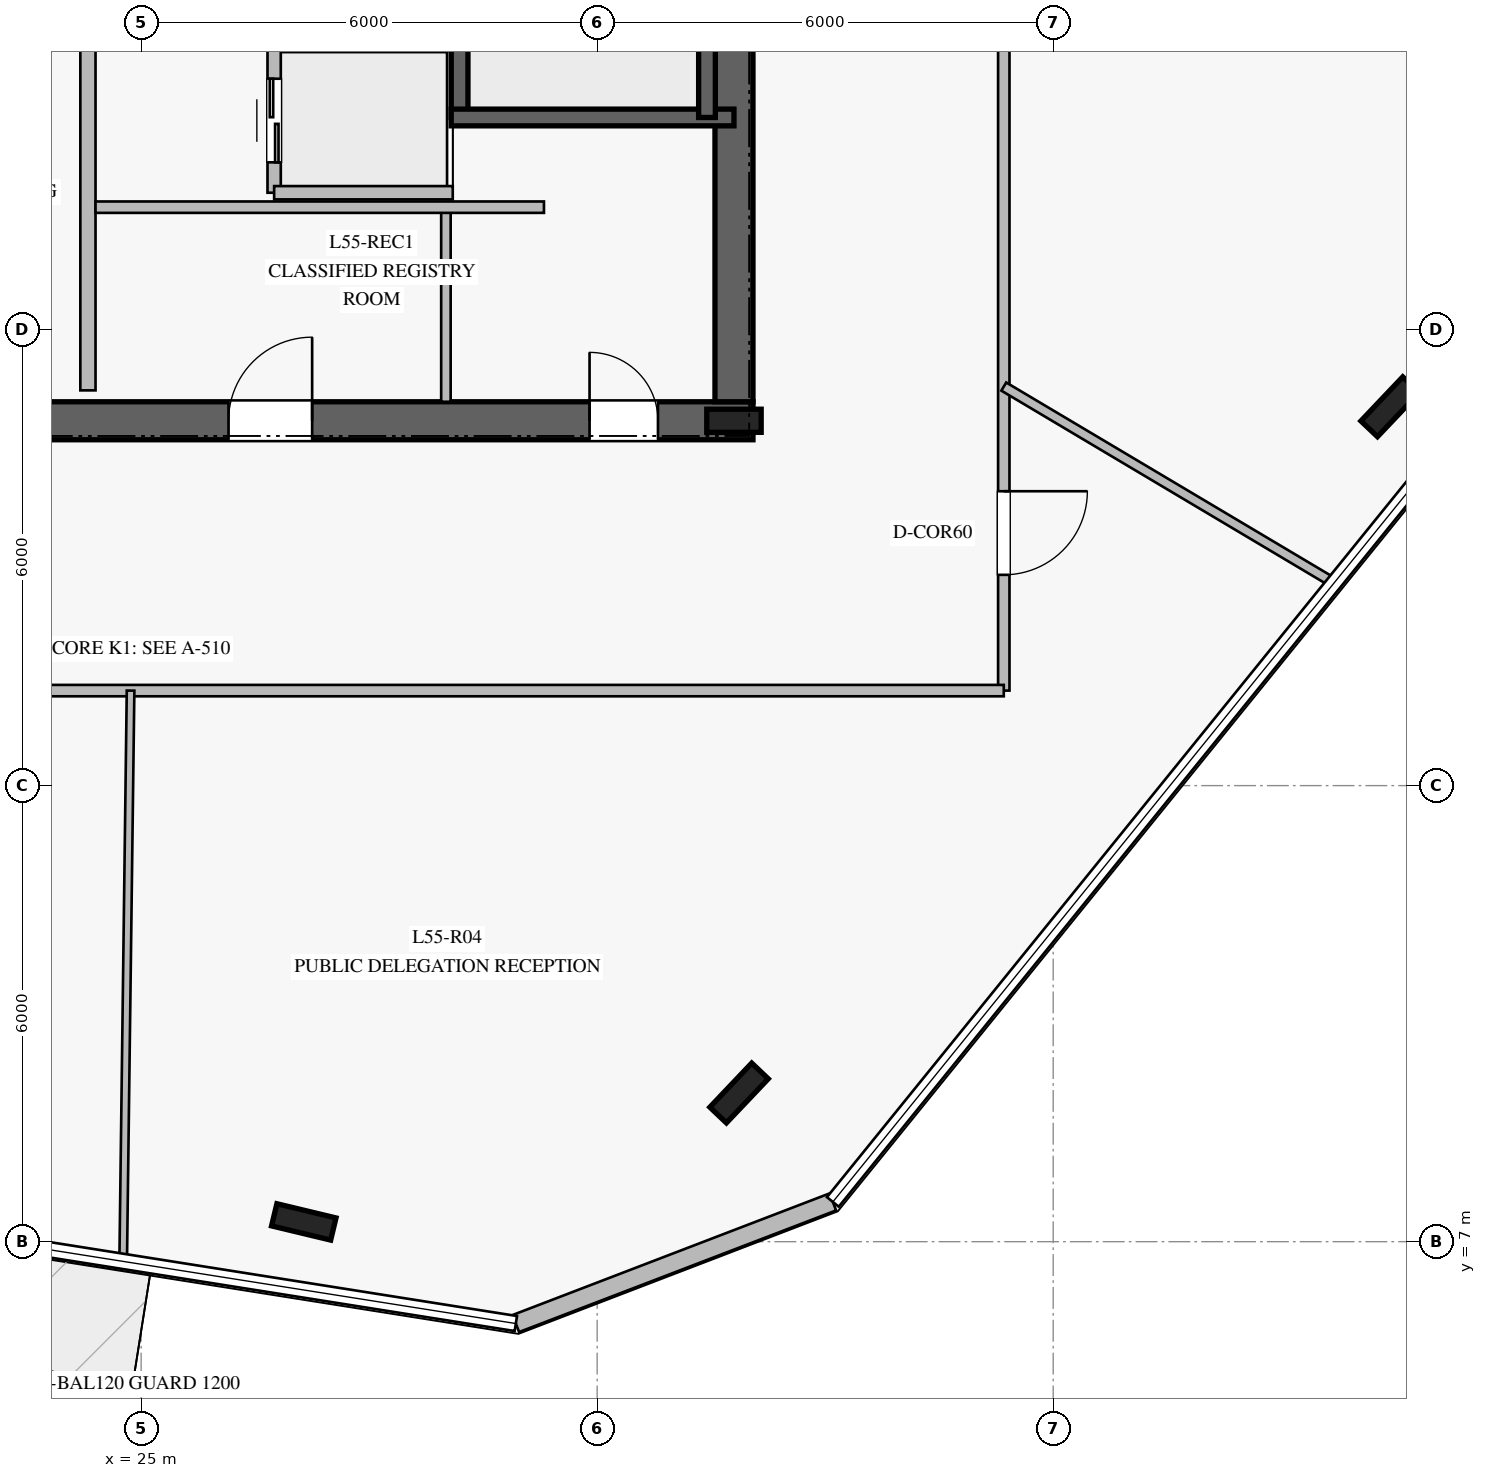
"""IFC4 building model, lengths in metres.
Left out: names, types, materials, properties, quantities, classifications, styles, units other than length and angle.
Written with IfcOpenShell. Run it as: python <this file> out.ifc"""

import sys

from ifc_helpers import new_model, si_unit, direction, frame, frame_2d, origin, origin_2d, place, context, subcontext, project, spatial, rectangle, i_section, extrude, element, fill, save


model = new_model("IFC4")
c1 = context("Model", 3, precision=1e-05, world=origin(), true_north=direction((0.0, 1.0)))
c2 = subcontext(c1, "Body", "Model", "MODEL_VIEW")
j1 = project(units=[si_unit("LENGTHUNIT", "METRE"), si_unit("PLANEANGLEUNIT", "RADIAN")], contexts=[c1])
p1 = place(None, origin())
s1 = spatial("IfcSite", under=j1, at=p1, CompositionType="ELEMENT")
p2 = place(p1, origin())
s2 = spatial("IfcBuilding", under=s1, at=p2, CompositionType="ELEMENT")
p3 = place(p2, frame((0.0, 0.0, 228.8)))
s3 = spatial("IfcBuildingStorey", under=s2, at=p3, CompositionType="ELEMENT", Elevation=228.8)
p4 = place(p3, frame((16.95, 17.8, 0.0), z_axis=(0.0, 0.0, 1.0), x_axis=(1.0, 0.0, 0.0)))
e1 = element("IfcWall", 1, at=p4, inside=s3, PredefinedType="SHEAR", context=c2, shape_type="SweptSolid", body=[
    extrude(rectangle(XDim=16.1, YDim=0.5, at=frame_2d((8.05, 0.0))), origin(), (0.0, 0.0, 1.0), 3.78),
])
p5 = place(p4, frame((5.0, 0.0, 0.0)))
e2 = element("IfcOpeningElement", 2, at=p5, cuts=e1, PredefinedType="OPENING", context=c2, shape_type="SweptSolid", body=[
    extrude(rectangle(XDim=1.2, YDim=2.25, at=frame_2d((0.6, 1.125))), frame((0.0, 0.26, 0.0), z_axis=(0.0, -1.0, 0.0), x_axis=(1.0, 0.0, 0.0)), (0.0, 0.0, 1.0), 0.52),
])
p6 = place(p4, frame((13.95, 0.0, 0.0)))
e3 = element("IfcOpeningElement", 3, at=p6, cuts=e1, PredefinedType="OPENING", context=c2, shape_type="SweptSolid", body=[
    extrude(rectangle(XDim=0.9, YDim=2.1, at=frame_2d((0.45, 1.05))), frame((0.0, 0.26, 0.0), z_axis=(0.0, -1.0, 0.0), x_axis=(1.0, 0.0, 0.0)), (0.0, 0.0, 1.0), 0.52),
])
p7 = place(p4, frame((9.2, 0.0, 0.0)))
e4 = element("IfcOpeningElement", 4, at=p7, cuts=e1, PredefinedType="OPENING", context=c2, shape_type="SweptSolid", body=[
    extrude(rectangle(XDim=1.1, YDim=2.2, at=frame_2d((0.55, 1.1))), frame((0.0, 0.26, 0.0), z_axis=(0.0, -1.0, 0.0), x_axis=(1.0, 0.0, 0.0)), (0.0, 0.0, 1.0), 0.52),
])
p8 = place(p3, frame((32.8, 18.05, 0.0), z_axis=(0.0, 0.0, 1.0), x_axis=(0.0, 1.0, 0.0)))
e5 = element("IfcWall", 5, at=p8, inside=s3, PredefinedType="SHEAR", context=c2, shape_type="SweptSolid", body=[
    extrude(rectangle(XDim=13.9, YDim=0.5, at=frame_2d((6.95, 0.0))), origin(), (0.0, 0.0, 1.0), 3.78),
])
p9 = place(p3, frame((32.8, 17.8, 0.0), z_axis=(0.0, 0.0, 1.0), x_axis=(1.0, 0.0, 0.0)))
e6 = element("IfcColumn", 6, at=p9, inside=s3, PredefinedType="COLUMN", context=c2, shape_type="SweptSolid", body=[
    extrude(i_section(OverallWidth=0.304, OverallDepth=0.716, WebThickness=0.021, FlangeThickness=0.04, at=origin_2d()), origin(), (0.0, 0.0, 1.0), 4.0),
])
p10 = place(p3, frame((29.19, 21.79, 0.0), z_axis=(0.0, 0.0, 1.0), x_axis=(0.0, 1.0, 0.0)))
e7 = element("IfcWall", 7, at=p10, inside=s3, PredefinedType="SOLIDWALL", context=c2, shape_type="SweptSolid", body=[
    extrude(rectangle(XDim=7.22, YDim=0.22, at=frame_2d((3.61, 0.0))), origin(), (0.0, 0.0, 1.0), 3.78),
])
p11 = place(p10, frame((5.88, 0.0, 0.0)))
e8 = element("IfcOpeningElement", 8, at=p11, cuts=e7, PredefinedType="OPENING", context=c2, shape_type="SweptSolid", body=[
    extrude(rectangle(XDim=1.15, YDim=2.2, at=frame_2d((0.575, 1.1))), frame((0.0, 0.12, 0.0), z_axis=(0.0, -1.0, 0.0), x_axis=(1.0, 0.0, 0.0)), (0.0, 0.0, 1.0), 0.24),
])
p12 = place(p3, frame((29.08, 21.79, 0.0), z_axis=(0.0, 0.0, 1.0), x_axis=(1.0, 0.0, 0.0)))
e9 = element("IfcWall", 9, at=p12, inside=s3, PredefinedType="SOLIDWALL", context=c2, shape_type="SweptSolid", body=[
    extrude(rectangle(XDim=3.72, YDim=0.22, at=frame_2d((1.86, 0.0))), origin(), (0.0, 0.0, 1.0), 3.78),
])
p13 = place(p3, frame((32.445, 29.01, 0.0), z_axis=(0.0, 0.0, 1.0), x_axis=(0.0, -1.0, 0.0)))
e10 = element("IfcWall", 10, at=p13, inside=s3, PredefinedType="SOLIDWALL", context=c2, shape_type="SweptSolid", body=[
    extrude(rectangle(XDim=7.22, YDim=0.22, at=frame_2d((3.61, 0.0))), origin(), (0.0, 0.0, 1.0), 3.78),
])
for number, where, z_axis, x_axis in (
    (11, (27.14, 7.26, 0.0), (0.0, 0.0, 1.0), (-0.972, 0.233, 0.0)),
    (12, (32.867, 8.956, 0.0), (0.0, 0.0, 1.0), (0.688, 0.725, 0.0)),
    (13, (41.433, 17.984, 0.0), (0.0, 0.0, 1.0), (0.688, 0.725, 0.0)),
):
    element("IfcColumn", number, at=place(p3, frame(where, z_axis=z_axis, x_axis=x_axis)), inside=s3, PredefinedType="COLUMN", context=c2, shape_type="SweptSolid", body=[
        extrude(i_section(OverallWidth=0.3, OverallDepth=0.8, WebThickness=0.018, FlangeThickness=0.033, at=origin_2d()), origin(), (0.0, 0.0, 1.0), 4.0),
    ])
p14 = place(p3, frame((29.93, 5.923, 0.0), z_axis=(0.0, 0.0, 1.0), x_axis=(0.933677607011, 0.358114682982, 0.0)))
e14 = element("IfcWall", 14, at=p14, inside=s3, PredefinedType="STANDARD", context=c2, shape_type="SweptSolid", body=[
    extrude(rectangle(XDim=4.468, YDim=0.24, at=frame_2d((2.234, 0.0))), origin(), (0.0, 0.0, 1.0), 3.78),
])
p15 = place(p3, frame((24.3, 18.2, 0.0), z_axis=(0.0, 0.0, 1.0), x_axis=(0.0, 1.0, 0.0)))
e15 = element("IfcWall", 15, at=p15, inside=s3, PredefinedType="PARTITIONING", context=c2, shape_type="SweptSolid", body=[
    extrude(rectangle(XDim=5.15, YDim=0.2, at=frame_2d((2.575, 0.0))), origin(), (0.0, 0.0, 1.0), 3.78),
])
p16 = place(p3, frame((29.01, 18.05, 0.0), z_axis=(0.0, 0.0, 1.0), x_axis=(0.0, 1.0, 0.0)))
e16 = element("IfcWall", 16, at=p16, inside=s3, PredefinedType="PARTITIONING", context=c2, shape_type="SweptSolid", body=[
    extrude(rectangle(XDim=2.5, YDim=0.125, at=frame_2d((1.25, 0.0))), origin(), (0.0, 0.0, 1.0), 3.78),
])
p17 = place(p3, frame((24.4, 20.61, 0.0), z_axis=(0.0, 0.0, 1.0), x_axis=(1.0, 0.0, 0.0)))
e17 = element("IfcWall", 17, at=p17, inside=s3, PredefinedType="PARTITIONING", context=c2, shape_type="SweptSolid", body=[
    extrude(rectangle(XDim=5.9, YDim=0.15, at=frame_2d((2.95, 0.0))), origin(), (0.0, 0.0, 1.0), 3.78),
])
p18 = place(p3, frame((26.75, 20.8, 0.0), z_axis=(0.0, 0.0, 1.0), x_axis=(0.0, 1.0, 0.0)))
e18 = element("IfcWall", 18, at=p18, inside=s3, PredefinedType="PARTITIONING", context=c2, shape_type="SweptSolid", body=[
    extrude(rectangle(XDim=1.9, YDim=0.175, at=frame_2d((0.95, 0.0))), origin(), (0.0, 0.0, 1.0), 3.78),
])
p19 = place(p18, frame((0.4, 0.0, 0.0)))
e19 = element("IfcOpeningElement", 19, at=p19, cuts=e18, PredefinedType="OPENING", context=c2, shape_type="SweptSolid", body=[
    extrude(rectangle(XDim=1.1, YDim=2.2, at=frame_2d((0.55, 1.1))), frame((0.0, 0.098, 0.0), z_axis=(0.0, -1.0, 0.0), x_axis=(1.0, 0.0, 0.0)), (0.0, 0.0, 1.0), 0.195),
])
p20 = place(p3, frame((26.75, 20.8, 0.0), z_axis=(0.0, 0.0, 1.0), x_axis=(1.0, 0.0, 0.0)))
e20 = element("IfcWall", 20, at=p20, inside=s3, PredefinedType="PARTITIONING", context=c2, shape_type="SweptSolid", body=[
    extrude(rectangle(XDim=2.35, YDim=0.175, at=frame_2d((1.175, 0.0))), origin(), (0.0, 0.0, 1.0), 3.78),
])
p21 = place(p3, frame((36.35, 35.75, 0.0), z_axis=(0.0, 0.0, 1.0), x_axis=(0.0, -1.0, 0.0)))
e21 = element("IfcWall", 21, at=p21, inside=s3, PredefinedType="PARTITIONING", context=c2, shape_type="SweptSolid", body=[
    extrude(rectangle(XDim=21.5, YDim=0.15, at=frame_2d((10.75, 0.0))), origin(), (0.0, 0.0, 1.0), 3.28),
])
p22 = place(p21, frame((18.877, 0.0, 0.0)))
e22 = element("IfcOpeningElement", 22, at=p22, cuts=e21, PredefinedType="OPENING", context=c2, shape_type="SweptSolid", body=[
    extrude(rectangle(XDim=1.1, YDim=2.2, at=frame_2d((0.55, 1.1))), frame((0.0, 0.085, 0.0), z_axis=(0.0, -1.0, 0.0), x_axis=(1.0, 0.0, 0.0)), (0.0, 0.0, 1.0), 0.17),
])
p23 = place(p21, frame((11.318, 0.0, 0.0)))
e23 = element("IfcOpeningElement", 23, at=p23, cuts=e21, PredefinedType="OPENING", context=c2, shape_type="SweptSolid", body=[
    extrude(rectangle(XDim=1.1, YDim=2.2, at=frame_2d((0.55, 1.1))), frame((0.0, 0.085, 0.0), z_axis=(0.0, -1.0, 0.0), x_axis=(1.0, 0.0, 0.0)), (0.0, 0.0, 1.0), 0.17),
])
p24 = place(p3, frame((36.35, 14.25, 0.0), z_axis=(0.0, 0.0, 1.0), x_axis=(-1.0, 0.0, 0.0)))
e24 = element("IfcWall", 24, at=p24, inside=s3, PredefinedType="PARTITIONING", context=c2, shape_type="SweptSolid", body=[
    extrude(rectangle(XDim=22.7, YDim=0.15, at=frame_2d((11.35, 0.0))), origin(), (0.0, 0.0, 1.0), 3.05),
])
p25 = place(p24, frame((16.272, 0.0, 0.0)))
e25 = element("IfcOpeningElement", 25, at=p25, cuts=e24, PredefinedType="OPENING", context=c2, shape_type="SweptSolid", body=[
    extrude(rectangle(XDim=1.1, YDim=2.2, at=frame_2d((0.55, 1.1))), frame((0.0, 0.085, 0.0), z_axis=(0.0, -1.0, 0.0), x_axis=(1.0, 0.0, 0.0)), (0.0, 0.0, 1.0), 0.17),
])
p26 = place(p3, frame((24.861, 14.25, 0.0), z_axis=(0.0, 0.0, 1.0), x_axis=(-0.012966880803, -0.999915926467, 0.0)))
e26 = element("IfcWall", 26, at=p26, inside=s3, PredefinedType="MOVABLE", context=c2, shape_type="SweptSolid", body=[
    extrude(rectangle(XDim=7.494, YDim=0.1, at=frame_2d((3.747, 0.0))), origin(), (0.0, 0.0, 1.0), 3.05),
])
p27 = place(p3, frame((36.35, 18.25, 0.0), z_axis=(0.0, 0.0, 1.0), x_axis=(0.859461673758, -0.511200187148, 0.0)))
e27 = element("IfcWall", 27, at=p27, inside=s3, PredefinedType="PARTITIONING", context=c2, shape_type="SweptSolid", body=[
    extrude(rectangle(XDim=5.039, YDim=0.125, at=frame_2d((2.52, 0.0))), origin(), (0.0, 0.0, 1.0), 3.18),
])
p28 = place(p6, origin())
e28 = element("IfcDoor", 28, at=p28, inside=s3, OperationType="SINGLE_SWING_LEFT", PredefinedType="DOOR", context=c2, shape_type="SweptSolid", body=[
    extrude(rectangle(XDim=0.9, YDim=2.1, at=frame_2d((0.45, 1.05))), frame((0.0, 0.025, 0.0), z_axis=(0.0, -1.0, 0.0), x_axis=(1.0, 0.0, 0.0)), (0.0, 0.0, 1.0), 0.05),
])
fill(e3, e28)
p29 = place(p7, origin())
e29 = element("IfcDoor", 29, at=p29, inside=s3, OperationType="SINGLE_SWING_RIGHT", PredefinedType="DOOR", context=c2, shape_type="SweptSolid", body=[
    extrude(rectangle(XDim=1.1, YDim=2.2, at=frame_2d((0.55, 1.1))), frame((0.0, 0.025, 0.0), z_axis=(0.0, -1.0, 0.0), x_axis=(1.0, 0.0, 0.0)), (0.0, 0.0, 1.0), 0.05),
])
fill(e4, e29)
p30 = place(p19, origin())
e30 = element("IfcDoor", 30, at=p30, inside=s3, OperationType="DOUBLE_DOOR_SLIDING", PredefinedType="DOOR", context=c2, shape_type="SweptSolid", body=[
    extrude(rectangle(XDim=1.1, YDim=2.2, at=frame_2d((0.55, 1.1))), frame((0.0, 0.025, 0.0), z_axis=(0.0, -1.0, 0.0), x_axis=(1.0, 0.0, 0.0)), (0.0, 0.0, 1.0), 0.05),
])
fill(e19, e30)
p31 = place(p22, origin())
e31 = element("IfcDoor", 31, at=p31, inside=s3, OperationType="SINGLE_SWING_LEFT", PredefinedType="DOOR", context=c2, shape_type="SweptSolid", body=[
    extrude(rectangle(XDim=1.1, YDim=2.2, at=frame_2d((0.55, 1.1))), frame((0.0, 0.025, 0.0), z_axis=(0.0, -1.0, 0.0), x_axis=(1.0, 0.0, 0.0)), (0.0, 0.0, 1.0), 0.05),
])
fill(e22, e31)
save(model, sys.argv[1])
